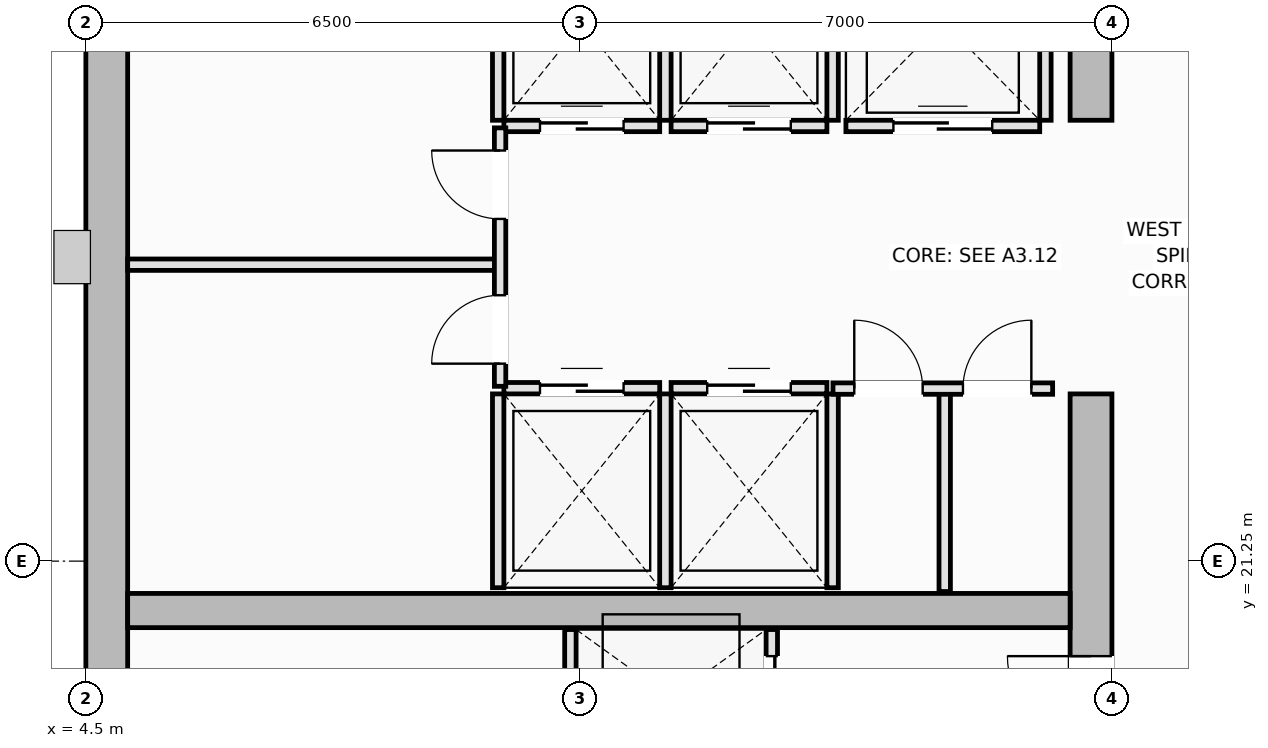
"""IFC4 building model, lengths in metres.
Left out: names, types, materials, properties, quantities, classifications, styles, units other than length and angle.
Written with IfcOpenShell. Run it as: python <this file> out.ifc"""

import sys

from ifc_helpers import new_model, si_unit, direction, frame, frame_2d, origin, place, context, subcontext, project, spatial, rectangle, extrude, element, fill, save


model = new_model("IFC4")
c1 = context("Model", 3, precision=1e-05, world=origin(), true_north=direction((0.0, 1.0)))
c2 = subcontext(c1, "Body", "Model", "MODEL_VIEW")
j1 = project(units=[si_unit("LENGTHUNIT", "METRE"), si_unit("PLANEANGLEUNIT", "RADIAN")], contexts=[c1])
p1 = place(None, origin())
s1 = spatial("IfcSite", under=j1, at=p1, CompositionType="ELEMENT")
p2 = place(p1, origin())
s2 = spatial("IfcBuilding", under=s1, at=p2, CompositionType="ELEMENT")
p3 = place(p2, frame((0.0, 0.0, 202.25)))
s3 = spatial("IfcBuildingStorey", under=s2, at=p3, CompositionType="ELEMENT", Elevation=202.25)
p4 = place(p3, frame((4.775, 14.55, 0.0), z_axis=(0.0, 0.0, 1.0), x_axis=(0.0, 1.0, 0.0)))
e1 = element("IfcWall", 1, at=p4, inside=s3, PredefinedType="SHEAR", context=c2, shape_type="SweptSolid", body=[
    extrude(rectangle(XDim=21.4, YDim=0.55, at=frame_2d((10.7, 0.0))), origin(), (0.0, 0.0, 1.0), 3.55),
])
p5 = place(p3, frame((17.725, 14.55, 0.0), z_axis=(0.0, 0.0, 1.0), x_axis=(0.0, 1.0, 0.0)))
e2 = element("IfcWall", 2, at=p5, inside=s3, PredefinedType="SHEAR", context=c2, shape_type="SweptSolid", body=[
    extrude(rectangle(XDim=8.9, YDim=0.55, at=frame_2d((4.45, 0.0))), origin(), (0.0, 0.0, 1.0), 3.55),
])
p6 = place(p5, frame((4.35, 0.0, 0.0)))
e3 = element("IfcOpeningElement", 3, at=p6, cuts=e2, PredefinedType="OPENING", context=c2, shape_type="SweptSolid", body=[
    extrude(rectangle(XDim=1.1, YDim=2.15, at=frame_2d((0.55, 1.075))), frame((0.0, 0.285, 0.0), z_axis=(0.0, -1.0, 0.0), x_axis=(1.0, 0.0, 0.0)), (0.0, 0.0, 1.0), 0.57),
])
p7 = place(p3, frame((17.725, 27.05, 0.0), z_axis=(0.0, 0.0, 1.0), x_axis=(0.0, 1.0, 0.0)))
e4 = element("IfcWall", 4, at=p7, inside=s3, PredefinedType="SHEAR", context=c2, shape_type="SweptSolid", body=[
    extrude(rectangle(XDim=8.9, YDim=0.55, at=frame_2d((4.45, 0.0))), origin(), (0.0, 0.0, 1.0), 3.55),
])
p8 = place(p7, frame((3.45, 0.0, 0.0)))
e5 = element("IfcOpeningElement", 5, at=p8, cuts=e4, PredefinedType="OPENING", context=c2, shape_type="SweptSolid", body=[
    extrude(rectangle(XDim=1.1, YDim=2.15, at=frame_2d((0.55, 1.075))), frame((0.0, 0.285, 0.0), z_axis=(0.0, -1.0, 0.0), x_axis=(1.0, 0.0, 0.0)), (0.0, 0.0, 1.0), 0.57),
])
p9 = place(p3, frame((5.05, 20.6, 0.0), z_axis=(0.0, 0.0, 1.0), x_axis=(1.0, 0.0, 0.0)))
e6 = element("IfcWall", 6, at=p9, inside=s3, PredefinedType="SHEAR", context=c2, shape_type="SweptSolid", body=[
    extrude(rectangle(XDim=12.4, YDim=0.45, at=frame_2d((6.2, 0.0))), origin(), (0.0, 0.0, 1.0), 3.55),
])
p10 = place(p3, frame((10.0, 23.525, 0.0), z_axis=(0.0, 0.0, 1.0), x_axis=(1.0, 0.0, 0.0)))
e7 = element("IfcWall", 7, at=p10, inside=s3, PredefinedType="PARTITIONING", context=c2, shape_type="SweptSolid", body=[
    extrude(rectangle(XDim=2.05, YDim=0.15, at=frame_2d((1.025, 0.0))), origin(), (0.0, 0.0, 1.0), 3.37),
])
p11 = place(p10, frame((0.475, 0.0, 0.0)))
e8 = element("IfcOpeningElement", 8, at=p11, cuts=e7, PredefinedType="OPENING", context=c2, shape_type="SweptSolid", body=[
    extrude(rectangle(XDim=1.1, YDim=2.2, at=frame_2d((0.55, 1.1))), frame((0.0, 0.085, 0.0), z_axis=(0.0, -1.0, 0.0), x_axis=(1.0, 0.0, 0.0)), (0.0, 0.0, 1.0), 0.17),
])
for number, where, z_axis, x_axis in (
    (9, (9.925, 20.9, 0.0), (0.0, 0.0, 1.0), (0.0, 1.0, 0.0)),
    (10, (12.125, 20.9, 0.0), (0.0, 0.0, 1.0), (0.0, 1.0, 0.0)),
):
    element("IfcWall", number, at=place(p3, frame(where, z_axis=z_axis, x_axis=x_axis)), inside=s3, PredefinedType="PARTITIONING", context=c2, shape_type="SweptSolid", body=[
        extrude(rectangle(XDim=2.55, YDim=0.15, at=frame_2d((1.275, 0.0))), origin(), (0.0, 0.0, 1.0), 3.37),
    ])
p12 = place(p3, frame((12.2, 23.525, 0.0), z_axis=(0.0, 0.0, 1.0), x_axis=(1.0, 0.0, 0.0)))
e11 = element("IfcWall", 11, at=p12, inside=s3, PredefinedType="PARTITIONING", context=c2, shape_type="SweptSolid", body=[
    extrude(rectangle(XDim=2.05, YDim=0.15, at=frame_2d((1.025, 0.0))), origin(), (0.0, 0.0, 1.0), 3.37),
])
p13 = place(p12, frame((0.475, 0.0, 0.0)))
e12 = element("IfcOpeningElement", 12, at=p13, cuts=e11, PredefinedType="OPENING", context=c2, shape_type="SweptSolid", body=[
    extrude(rectangle(XDim=1.1, YDim=2.2, at=frame_2d((0.55, 1.1))), frame((0.0, 0.085, 0.0), z_axis=(0.0, -1.0, 0.0), x_axis=(1.0, 0.0, 0.0)), (0.0, 0.0, 1.0), 0.17),
])
p14 = place(p3, frame((14.325, 20.9, 0.0), z_axis=(0.0, 0.0, 1.0), x_axis=(0.0, 1.0, 0.0)))
e13 = element("IfcWall", 13, at=p14, inside=s3, PredefinedType="PARTITIONING", context=c2, shape_type="SweptSolid", body=[
    extrude(rectangle(XDim=2.55, YDim=0.15, at=frame_2d((1.275, 0.0))), origin(), (0.0, 0.0, 1.0), 3.37),
])
p15 = place(p3, frame((10.0, 26.975, 0.0), z_axis=(0.0, 0.0, 1.0), x_axis=(1.0, 0.0, 0.0)))
e14 = element("IfcWall", 14, at=p15, inside=s3, PredefinedType="PARTITIONING", context=c2, shape_type="SweptSolid", body=[
    extrude(rectangle(XDim=2.05, YDim=0.15, at=frame_2d((1.025, 0.0))), origin(), (0.0, 0.0, 1.0), 3.37),
])
p16 = place(p15, frame((0.475, 0.0, 0.0)))
e15 = element("IfcOpeningElement", 15, at=p16, cuts=e14, PredefinedType="OPENING", context=c2, shape_type="SweptSolid", body=[
    extrude(rectangle(XDim=1.1, YDim=2.2, at=frame_2d((0.55, 1.1))), frame((0.0, 0.085, 0.0), z_axis=(0.0, -1.0, 0.0), x_axis=(1.0, 0.0, 0.0)), (0.0, 0.0, 1.0), 0.17),
])
for number, where, z_axis, x_axis in (
    (16, (9.925, 27.05, 0.0), (0.0, 0.0, 1.0), (0.0, 1.0, 0.0)),
    (17, (12.125, 27.05, 0.0), (0.0, 0.0, 1.0), (0.0, 1.0, 0.0)),
):
    element("IfcWall", number, at=place(p3, frame(where, z_axis=z_axis, x_axis=x_axis)), inside=s3, PredefinedType="PARTITIONING", context=c2, shape_type="SweptSolid", body=[
        extrude(rectangle(XDim=2.55, YDim=0.15, at=frame_2d((1.275, 0.0))), origin(), (0.0, 0.0, 1.0), 3.37),
    ])
p17 = place(p3, frame((12.2, 26.975, 0.0), z_axis=(0.0, 0.0, 1.0), x_axis=(1.0, 0.0, 0.0)))
e18 = element("IfcWall", 18, at=p17, inside=s3, PredefinedType="PARTITIONING", context=c2, shape_type="SweptSolid", body=[
    extrude(rectangle(XDim=2.05, YDim=0.15, at=frame_2d((1.025, 0.0))), origin(), (0.0, 0.0, 1.0), 3.37),
])
p18 = place(p17, frame((0.475, 0.0, 0.0)))
e19 = element("IfcOpeningElement", 19, at=p18, cuts=e18, PredefinedType="OPENING", context=c2, shape_type="SweptSolid", body=[
    extrude(rectangle(XDim=1.1, YDim=2.2, at=frame_2d((0.55, 1.1))), frame((0.0, 0.085, 0.0), z_axis=(0.0, -1.0, 0.0), x_axis=(1.0, 0.0, 0.0)), (0.0, 0.0, 1.0), 0.17),
])
p19 = place(p3, frame((14.325, 27.05, 0.0), z_axis=(0.0, 0.0, 1.0), x_axis=(0.0, 1.0, 0.0)))
e20 = element("IfcWall", 20, at=p19, inside=s3, PredefinedType="PARTITIONING", context=c2, shape_type="SweptSolid", body=[
    extrude(rectangle(XDim=2.55, YDim=0.15, at=frame_2d((1.275, 0.0))), origin(), (0.0, 0.0, 1.0), 3.37),
])
p20 = place(p3, frame((14.5, 26.975, 0.0), z_axis=(0.0, 0.0, 1.0), x_axis=(1.0, 0.0, 0.0)))
e21 = element("IfcWall", 21, at=p20, inside=s3, PredefinedType="PARTITIONING", context=c2, shape_type="SweptSolid", body=[
    extrude(rectangle(XDim=2.55, YDim=0.15, at=frame_2d((1.275, 0.0))), origin(), (0.0, 0.0, 1.0), 3.37),
])
p21 = place(p20, frame((0.625, 0.0, 0.0)))
e22 = element("IfcOpeningElement", 22, at=p21, cuts=e21, PredefinedType="OPENING", context=c2, shape_type="SweptSolid", body=[
    extrude(rectangle(XDim=1.3, YDim=2.2, at=frame_2d((0.65, 1.1))), frame((0.0, 0.085, 0.0), z_axis=(0.0, -1.0, 0.0), x_axis=(1.0, 0.0, 0.0)), (0.0, 0.0, 1.0), 0.17),
])
p22 = place(p3, frame((17.125, 27.05, 0.0), z_axis=(0.0, 0.0, 1.0), x_axis=(0.0, 1.0, 0.0)))
e23 = element("IfcWall", 23, at=p22, inside=s3, PredefinedType="PARTITIONING", context=c2, shape_type="SweptSolid", body=[
    extrude(rectangle(XDim=2.6, YDim=0.15, at=frame_2d((1.3, 0.0))), origin(), (0.0, 0.0, 1.0), 3.37),
])
p23 = place(p3, frame((10.875, 18.55, 0.0), z_axis=(0.0, 0.0, 1.0), x_axis=(0.0, 1.0, 0.0)))
e24 = element("IfcWall", 24, at=p23, inside=s3, PredefinedType="PARTITIONING", context=c2, shape_type="SweptSolid", body=[
    extrude(rectangle(XDim=1.8, YDim=0.15, at=frame_2d((0.9, 0.0))), origin(), (0.0, 0.0, 1.0), 3.37),
])
p24 = place(p3, frame((13.525, 18.55, 0.0), z_axis=(0.0, 0.0, 1.0), x_axis=(0.0, 1.0, 0.0)))
e25 = element("IfcWall", 25, at=p24, inside=s3, PredefinedType="PARTITIONING", context=c2, shape_type="SweptSolid", body=[
    extrude(rectangle(XDim=1.8, YDim=0.15, at=frame_2d((0.9, 0.0))), origin(), (0.0, 0.0, 1.0), 3.37),
])
p25 = place(p24, frame((0.35, 0.0, 0.0)))
e26 = element("IfcOpeningElement", 26, at=p25, cuts=e25, PredefinedType="OPENING", context=c2, shape_type="SweptSolid", body=[
    extrude(rectangle(XDim=1.1, YDim=2.2, at=frame_2d((0.55, 1.1))), frame((0.0, 0.085, 0.0), z_axis=(0.0, -1.0, 0.0), x_axis=(1.0, 0.0, 0.0)), (0.0, 0.0, 1.0), 0.17),
])
p26 = place(p3, frame((5.05, 25.15, 0.0), z_axis=(0.0, 0.0, 1.0), x_axis=(1.0, 0.0, 0.0)))
e27 = element("IfcWall", 27, at=p26, inside=s3, PredefinedType="PARTITIONING", context=c2, shape_type="SweptSolid", body=[
    extrude(rectangle(XDim=4.9, YDim=0.15, at=frame_2d((2.45, 0.0))), origin(), (0.0, 0.0, 1.0), 3.37),
])
p27 = place(p3, frame((9.95, 23.55, 0.0), z_axis=(0.0, 0.0, 1.0), x_axis=(0.0, 1.0, 0.0)))
e28 = element("IfcWall", 28, at=p27, inside=s3, PredefinedType="PARTITIONING", context=c2, shape_type="SweptSolid", body=[
    extrude(rectangle(XDim=3.4, YDim=0.15, at=frame_2d((1.7, 0.0))), origin(), (0.0, 0.0, 1.0), 3.37),
])
p28 = place(p27, frame((0.298, 0.0, 0.0)))
e29 = element("IfcOpeningElement", 29, at=p28, cuts=e28, PredefinedType="OPENING", context=c2, shape_type="SweptSolid", body=[
    extrude(rectangle(XDim=0.9, YDim=2.1, at=frame_2d((0.45, 1.05))), frame((0.0, 0.085, 0.0), z_axis=(0.0, -1.0, 0.0), x_axis=(1.0, 0.0, 0.0)), (0.0, 0.0, 1.0), 0.17),
])
p29 = place(p27, frame((2.202, 0.0, 0.0)))
e30 = element("IfcOpeningElement", 30, at=p29, cuts=e28, PredefinedType="OPENING", context=c2, shape_type="SweptSolid", body=[
    extrude(rectangle(XDim=0.9, YDim=2.1, at=frame_2d((0.45, 1.05))), frame((0.0, 0.085, 0.0), z_axis=(0.0, -1.0, 0.0), x_axis=(1.0, 0.0, 0.0)), (0.0, 0.0, 1.0), 0.17),
])
p30 = place(p3, frame((15.8, 20.85, 0.0), z_axis=(0.0, 0.0, 1.0), x_axis=(0.0, 1.0, 0.0)))
e31 = element("IfcWall", 31, at=p30, inside=s3, PredefinedType="PARTITIONING", context=c2, shape_type="SweptSolid", body=[
    extrude(rectangle(XDim=2.67, YDim=0.15, at=frame_2d((1.335, 0.0))), origin(), (0.0, 0.0, 1.0), 3.37),
])
p31 = place(p3, frame((14.33, 23.52, 0.0), z_axis=(0.0, 0.0, 1.0), x_axis=(1.0, 0.0, 0.0)))
e32 = element("IfcWall", 32, at=p31, inside=s3, PredefinedType="PARTITIONING", context=c2, shape_type="SweptSolid", body=[
    extrude(rectangle(XDim=2.89, YDim=0.15, at=frame_2d((1.445, 0.0))), origin(), (0.0, 0.0, 1.0), 3.37),
])
p32 = place(p31, frame((0.28, 0.0, 0.0)))
e33 = element("IfcOpeningElement", 33, at=p32, cuts=e32, PredefinedType="OPENING", context=c2, shape_type="SweptSolid", body=[
    extrude(rectangle(XDim=0.9, YDim=2.1, at=frame_2d((0.45, 1.05))), frame((0.0, 0.085, 0.0), z_axis=(0.0, -1.0, 0.0), x_axis=(1.0, 0.0, 0.0)), (0.0, 0.0, 1.0), 0.17),
])
p33 = place(p31, frame((1.71, 0.0, 0.0)))
e34 = element("IfcOpeningElement", 34, at=p33, cuts=e32, PredefinedType="OPENING", context=c2, shape_type="SweptSolid", body=[
    extrude(rectangle(XDim=0.9, YDim=2.1, at=frame_2d((0.45, 1.05))), frame((0.0, 0.085, 0.0), z_axis=(0.0, -1.0, 0.0), x_axis=(1.0, 0.0, 0.0)), (0.0, 0.0, 1.0), 0.17),
])
p34 = place(p11, origin())
e35 = element("IfcDoor", 35, at=p34, inside=s3, OperationType="DOUBLE_DOOR_SLIDING", PredefinedType="DOOR", context=c2, shape_type="SweptSolid", body=[
    extrude(rectangle(XDim=1.1, YDim=2.2, at=frame_2d((0.55, 1.1))), frame((0.0, 0.025, 0.0), z_axis=(0.0, -1.0, 0.0), x_axis=(1.0, 0.0, 0.0)), (0.0, 0.0, 1.0), 0.05),
])
fill(e8, e35)
p35 = place(p13, origin())
e36 = element("IfcDoor", 36, at=p35, inside=s3, OperationType="DOUBLE_DOOR_SLIDING", PredefinedType="DOOR", context=c2, shape_type="SweptSolid", body=[
    extrude(rectangle(XDim=1.1, YDim=2.2, at=frame_2d((0.55, 1.1))), frame((0.0, 0.025, 0.0), z_axis=(0.0, -1.0, 0.0), x_axis=(1.0, 0.0, 0.0)), (0.0, 0.0, 1.0), 0.05),
])
fill(e12, e36)
p36 = place(p16, origin())
e37 = element("IfcDoor", 37, at=p36, inside=s3, OperationType="DOUBLE_DOOR_SLIDING", PredefinedType="DOOR", context=c2, shape_type="SweptSolid", body=[
    extrude(rectangle(XDim=1.1, YDim=2.2, at=frame_2d((0.55, 1.1))), frame((0.0, 0.025, 0.0), z_axis=(0.0, -1.0, 0.0), x_axis=(1.0, 0.0, 0.0)), (0.0, 0.0, 1.0), 0.05),
])
fill(e15, e37)
p37 = place(p18, origin())
e38 = element("IfcDoor", 38, at=p37, inside=s3, OperationType="DOUBLE_DOOR_SLIDING", PredefinedType="DOOR", context=c2, shape_type="SweptSolid", body=[
    extrude(rectangle(XDim=1.1, YDim=2.2, at=frame_2d((0.55, 1.1))), frame((0.0, 0.025, 0.0), z_axis=(0.0, -1.0, 0.0), x_axis=(1.0, 0.0, 0.0)), (0.0, 0.0, 1.0), 0.05),
])
fill(e19, e38)
p38 = place(p21, origin())
e39 = element("IfcDoor", 39, at=p38, inside=s3, OperationType="DOUBLE_DOOR_SLIDING", PredefinedType="DOOR", context=c2, shape_type="SweptSolid", body=[
    extrude(rectangle(XDim=1.3, YDim=2.2, at=frame_2d((0.65, 1.1))), frame((0.0, 0.025, 0.0), z_axis=(0.0, -1.0, 0.0), x_axis=(1.0, 0.0, 0.0)), (0.0, 0.0, 1.0), 0.05),
])
fill(e22, e39)
p39 = place(p25, origin())
e40 = element("IfcDoor", 40, at=p39, inside=s3, OperationType="DOUBLE_DOOR_SLIDING", PredefinedType="DOOR", context=c2, shape_type="SweptSolid", body=[
    extrude(rectangle(XDim=1.1, YDim=2.2, at=frame_2d((0.55, 1.1))), frame((0.0, 0.025, 0.0), z_axis=(0.0, -1.0, 0.0), x_axis=(1.0, 0.0, 0.0)), (0.0, 0.0, 1.0), 0.05),
])
fill(e26, e40)
p40 = place(p6, origin())
e41 = element("IfcDoor", 41, at=p40, inside=s3, OperationType="SINGLE_SWING_RIGHT", PredefinedType="DOOR", context=c2, shape_type="SweptSolid", body=[
    extrude(rectangle(XDim=1.1, YDim=2.15, at=frame_2d((0.55, 1.075))), frame((0.0, 0.025, 0.0), z_axis=(0.0, -1.0, 0.0), x_axis=(1.0, 0.0, 0.0)), (0.0, 0.0, 1.0), 0.05),
])
fill(e3, e41)
p41 = place(p28, origin())
e42 = element("IfcDoor", 42, at=p41, inside=s3, OperationType="SINGLE_SWING_LEFT", PredefinedType="DOOR", context=c2, shape_type="SweptSolid", body=[
    extrude(rectangle(XDim=0.9, YDim=2.1, at=frame_2d((0.45, 1.05))), frame((0.0, 0.025, 0.0), z_axis=(0.0, -1.0, 0.0), x_axis=(1.0, 0.0, 0.0)), (0.0, 0.0, 1.0), 0.05),
])
fill(e29, e42)
p42 = place(p29, origin())
e43 = element("IfcDoor", 43, at=p42, inside=s3, OperationType="SINGLE_SWING_RIGHT", PredefinedType="DOOR", context=c2, shape_type="SweptSolid", body=[
    extrude(rectangle(XDim=0.9, YDim=2.1, at=frame_2d((0.45, 1.05))), frame((0.0, 0.025, 0.0), z_axis=(0.0, -1.0, 0.0), x_axis=(1.0, 0.0, 0.0)), (0.0, 0.0, 1.0), 0.05),
])
fill(e30, e43)
p43 = place(p32, origin())
e44 = element("IfcDoor", 44, at=p43, inside=s3, OperationType="SINGLE_SWING_LEFT", PredefinedType="DOOR", context=c2, shape_type="SweptSolid", body=[
    extrude(rectangle(XDim=0.9, YDim=2.1, at=frame_2d((0.45, 1.05))), frame((0.0, 0.025, 0.0), z_axis=(0.0, -1.0, 0.0), x_axis=(1.0, 0.0, 0.0)), (0.0, 0.0, 1.0), 0.05),
])
fill(e33, e44)
p44 = place(p33, origin())
e45 = element("IfcDoor", 45, at=p44, inside=s3, OperationType="SINGLE_SWING_RIGHT", PredefinedType="DOOR", context=c2, shape_type="SweptSolid", body=[
    extrude(rectangle(XDim=0.9, YDim=2.1, at=frame_2d((0.45, 1.05))), frame((0.0, 0.025, 0.0), z_axis=(0.0, -1.0, 0.0), x_axis=(1.0, 0.0, 0.0)), (0.0, 0.0, 1.0), 0.05),
])
fill(e34, e45)
save(model, sys.argv[1])
